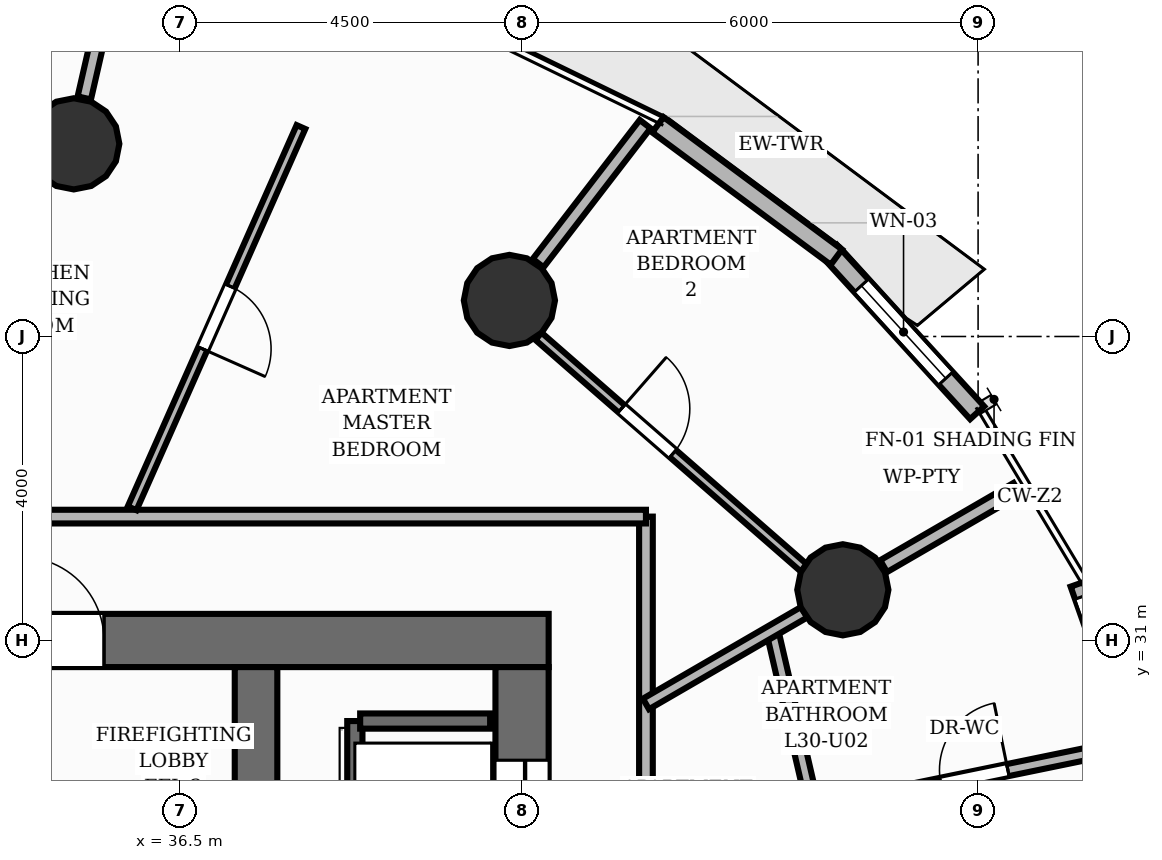
"""IFC4 building model, lengths in metres.
Left out: names, types, materials, properties, quantities, classifications, styles, units other than length and angle.
Written with IfcOpenShell. Run it as: python <this file> out.ifc"""

import sys

from ifc_helpers import new_model, si_unit, direction, frame, frame_2d, origin, origin_2d, place, context, subcontext, project, spatial, rectangle, circle, extrude, element, fill, save


model = new_model("IFC4")
c1 = context("Model", 3, precision=1e-05, world=origin(), true_north=direction((0.0, 1.0)))
c2 = subcontext(c1, "Body", "Model", "MODEL_VIEW")
j1 = project(units=[si_unit("LENGTHUNIT", "METRE"), si_unit("PLANEANGLEUNIT", "RADIAN")], contexts=[c1])
p1 = place(None, origin())
s1 = spatial("IfcSite", under=j1, at=p1, CompositionType="ELEMENT")
p2 = place(p1, origin())
s2 = spatial("IfcBuilding", under=s1, at=p2, CompositionType="ELEMENT")
p3 = place(p2, frame((0.0, 0.0, 102.88)))
s3 = spatial("IfcBuildingStorey", under=s2, at=p3, CompositionType="ELEMENT", Elevation=102.88)
p4 = place(p3, frame((22.65, 31.0, 0.0), z_axis=(0.0, 0.0, 1.0), x_axis=(1.0, 0.0, 0.0)))
e1 = element("IfcWall", 1, at=p4, inside=s3, PredefinedType="SHEAR", context=c2, shape_type="SweptSolid", body=[
    extrude(rectangle(XDim=18.7, YDim=0.7, at=frame_2d((9.35, 0.0))), origin(), (0.0, 0.0, 1.0), 3.2),
])
p5 = place(p4, frame((11.75, 0.0, 0.0)))
e2 = element("IfcOpeningElement", 2, at=p5, cuts=e1, PredefinedType="OPENING", context=c2, shape_type="SweptSolid", body=[
    extrude(rectangle(XDim=1.1, YDim=2.15, at=frame_2d((0.55, 1.075))), frame((0.0, 0.36, 0.0), z_axis=(0.0, -1.0, 0.0), x_axis=(1.0, 0.0, 0.0)), (0.0, 0.0, 1.0), 0.72),
])
p6 = place(p3, frame((41.0, 17.35, 0.0), z_axis=(0.0, 0.0, 1.0), x_axis=(0.0, 1.0, 0.0)))
e3 = element("IfcWall", 3, at=p6, inside=s3, PredefinedType="SHEAR", context=c2, shape_type="SweptSolid", body=[
    extrude(rectangle(XDim=13.3, YDim=0.7, at=frame_2d((6.65, 0.0))), origin(), (0.0, 0.0, 1.0), 3.2),
])
p7 = place(p6, frame((1.225, 0.0, 0.0)))
e4 = element("IfcOpeningElement", 4, at=p7, cuts=e3, PredefinedType="OPENING", context=c2, shape_type="SweptSolid", body=[
    extrude(rectangle(XDim=1.05, YDim=2.15, at=frame_2d((0.525, 1.075))), frame((0.0, 0.36, 0.0), z_axis=(0.0, -1.0, 0.0), x_axis=(1.0, 0.0, 0.0)), (0.0, 0.0, 1.0), 0.72),
])
p8 = place(p6, frame((4.475, 0.0, 0.0)))
e5 = element("IfcOpeningElement", 5, at=p8, cuts=e3, PredefinedType="OPENING", context=c2, shape_type="SweptSolid", body=[
    extrude(rectangle(XDim=1.05, YDim=2.15, at=frame_2d((0.525, 1.075))), frame((0.0, 0.36, 0.0), z_axis=(0.0, -1.0, 0.0), x_axis=(1.0, 0.0, 0.0)), (0.0, 0.0, 1.0), 0.72),
])
p9 = place(p6, frame((7.775, 0.0, 0.0)))
e6 = element("IfcOpeningElement", 6, at=p9, cuts=e3, PredefinedType="OPENING", context=c2, shape_type="SweptSolid", body=[
    extrude(rectangle(XDim=1.05, YDim=2.15, at=frame_2d((0.525, 1.075))), frame((0.0, 0.36, 0.0), z_axis=(0.0, -1.0, 0.0), x_axis=(1.0, 0.0, 0.0)), (0.0, 0.0, 1.0), 0.72),
])
p10 = place(p6, frame((11.025, 0.0, 0.0)))
e7 = element("IfcOpeningElement", 7, at=p10, cuts=e3, PredefinedType="OPENING", context=c2, shape_type="SweptSolid", body=[
    extrude(rectangle(XDim=1.05, YDim=2.15, at=frame_2d((0.525, 1.075))), frame((0.0, 0.36, 0.0), z_axis=(0.0, -1.0, 0.0), x_axis=(1.0, 0.0, 0.0)), (0.0, 0.0, 1.0), 0.72),
])
p11 = place(p3, frame((37.5, 17.35, 0.0), z_axis=(0.0, 0.0, 1.0), x_axis=(0.0, 1.0, 0.0)))
e8 = element("IfcWall", 8, at=p11, inside=s3, PredefinedType="SHEAR", context=c2, shape_type="SweptSolid", body=[
    extrude(rectangle(XDim=13.3, YDim=0.56, at=frame_2d((6.65, 0.0))), origin(), (0.0, 0.0, 1.0), 3.2),
])
for number, where, z_axis, x_axis in (
    (9, (45.22, 31.667, 0.0), (0.0, 0.0, 1.0), (1.0, 0.0, 0.0)),
    (10, (40.833, 35.474, 0.0), (0.0, 0.0, 1.0), (1.0, 0.0, 0.0)),
    (11, (35.102, 37.535, 0.0), (0.0, 0.0, 1.0), (1.0, 0.0, 0.0)),
):
    element("IfcColumn", number, at=place(p3, frame(where, z_axis=z_axis, x_axis=x_axis)), inside=s3, PredefinedType="COLUMN", context=c2, shape_type="SweptSolid", body=[
        extrude(circle(Radius=0.6, at=origin_2d()), origin(), (0.0, 0.0, 1.0), 3.2),
    ])
p12 = place(p3, frame((45.051, 36.121, 0.0), z_axis=(0.0, 0.0, 1.0), x_axis=(0.673691100196, -0.739013059098, 0.0)))
e12 = element("IfcWall", 12, at=p12, inside=s3, PredefinedType="SOLIDWALL", context=c2, shape_type="SweptSolid", body=[
    extrude(rectangle(XDim=2.874, YDim=0.25, at=frame_2d((1.437, 0.0))), origin(), (0.0, 0.0, 1.0), 2.96),
])
p13 = place(p12, frame((0.612, 0.0, 0.85)))
e13 = element("IfcOpeningElement", 13, at=p13, cuts=e12, PredefinedType="OPENING", context=c2, shape_type="SweptSolid", body=[
    extrude(rectangle(XDim=1.65, YDim=1.55, at=frame_2d((0.825, 0.775))), frame((0.0, 0.135, 0.0), z_axis=(0.0, -1.0, 0.0), x_axis=(1.0, 0.0, 0.0)), (0.0, 0.0, 1.0), 0.27),
])
p14 = place(p3, frame((42.787, 37.785, 0.0), z_axis=(0.0, 0.0, 1.0), x_axis=(0.803255279066, -0.595634918933, 0.0)))
e14 = element("IfcWall", 14, at=p14, inside=s3, PredefinedType="SOLIDWALL", context=c2, shape_type="SweptSolid", body=[
    extrude(rectangle(XDim=2.923, YDim=0.25, at=frame_2d((1.462, 0.0))), origin(), (0.0, 0.0, 1.0), 2.96),
])
p15 = place(p3, frame((48.335, 31.75, 0.0), z_axis=(0.0, 0.0, 1.0), x_axis=(0.332923265962, -0.942953921982, 0.0)))
e15 = element("IfcWall", 15, at=p15, inside=s3, PredefinedType="SOLIDWALL", context=c2, shape_type="SweptSolid", body=[
    extrude(rectangle(XDim=2.847, YDim=0.25, at=frame_2d((1.424, 0.0))), origin(), (0.0, 0.0, 1.0), 2.96),
])
p16 = place(p15, frame((0.175, 0.0, 0.85)))
e16 = element("IfcOpeningElement", 16, at=p16, cuts=e15, PredefinedType="OPENING", context=c2, shape_type="SweptSolid", body=[
    extrude(rectangle(XDim=1.65, YDim=1.55, at=frame_2d((0.825, 0.775))), frame((0.0, 0.135, 0.0), z_axis=(0.0, -1.0, 0.0), x_axis=(1.0, 0.0, 0.0)), (0.0, 0.0, 1.0), 0.27),
])
p17 = place(p3, frame((38.8, 18.06, 0.0), z_axis=(0.0, 0.0, 1.0), x_axis=(0.0, 1.0, 0.0)))
e17 = element("IfcWall", 17, at=p17, inside=s3, PredefinedType="SHEAR", context=c2, shape_type="SweptSolid", body=[
    extrude(rectangle(XDim=11.88, YDim=0.2, at=frame_2d((5.94, 0.0))), origin(), (0.0, 0.0, 1.0), 3.2),
])
p18 = place(p3, frame((38.87, 29.94, 0.0), z_axis=(0.0, 0.0, 1.0), x_axis=(1.0, 0.0, 0.0)))
e18 = element("IfcWall", 18, at=p18, inside=s3, PredefinedType="SHEAR", context=c2, shape_type="SweptSolid", body=[
    extrude(rectangle(XDim=1.71, YDim=0.2, at=frame_2d((0.855, 0.0))), origin(), (0.0, 0.0, 1.0), 3.2),
])
p19 = place(p3, frame((45.757, 31.978, 0.0), z_axis=(0.0, 0.0, 1.0), x_axis=(0.865046864493, 0.501691062539, 0.0)))
e19 = element("IfcWall", 19, at=p19, inside=s3, PredefinedType="PARTITIONING", context=c2, shape_type="SweptSolid", body=[
    extrude(rectangle(XDim=2.028, YDim=0.18, at=frame_2d((1.014, 0.0))), origin(), (0.0, 0.0, 1.0), 2.261),
])
p20 = place(p3, frame((41.212, 35.966, 0.0), z_axis=(0.0, 0.0, 1.0), x_axis=(0.610007255548, 0.792395827967, 0.0)))
e20 = element("IfcWall", 20, at=p20, inside=s3, PredefinedType="PARTITIONING", context=c2, shape_type="SweptSolid", body=[
    extrude(rectangle(XDim=2.308, YDim=0.18, at=frame_2d((1.154, 0.0))), origin(), (0.0, 0.0, 1.0), 2.261),
])
p21 = place(p3, frame((35.24, 38.139, 0.0), z_axis=(0.0, 0.0, 1.0), x_axis=(0.2234127464, 0.974723932581, 0.0)))
e21 = element("IfcWall", 21, at=p21, inside=s3, PredefinedType="PARTITIONING", context=c2, shape_type="SweptSolid", body=[
    extrude(rectangle(XDim=1.849, YDim=0.18, at=frame_2d((0.924, 0.0))), origin(), (0.0, 0.0, 1.0), 2.261),
])
p22 = place(p3, frame((42.63, 32.63, 0.0), z_axis=(0.0, 0.0, 1.0), x_axis=(0.0, -1.0, 0.0)))
e22 = element("IfcWall", 22, at=p22, inside=s3, PredefinedType="PARTITIONING", context=c2, shape_type="SweptSolid", body=[
    extrude(rectangle(XDim=6.23, YDim=0.18, at=frame_2d((3.115, 0.0))), origin(), (0.0, 0.0, 1.0), 2.955),
])
p23 = place(p3, frame((22.734, 32.63, 0.0), z_axis=(0.0, 0.0, 1.0), x_axis=(1.0, 0.0, 0.0)))
e23 = element("IfcWall", 23, at=p23, inside=s3, PredefinedType="PARTITIONING", context=c2, shape_type="SweptSolid", body=[
    extrude(rectangle(XDim=19.896, YDim=0.18, at=frame_2d((9.948, 0.0))), origin(), (0.0, 0.0, 1.0), 2.955),
])
p24 = place(p23, frame((11.004, 0.0, 0.0)))
e24 = element("IfcOpeningElement", 24, at=p24, cuts=e23, PredefinedType="OPENING", context=c2, shape_type="SweptSolid", body=[
    extrude(rectangle(XDim=1.05, YDim=2.15, at=frame_2d((0.525, 1.075))), frame((0.0, 0.1, 0.0), z_axis=(0.0, -1.0, 0.0), x_axis=(1.0, 0.0, 0.0)), (0.0, 0.0, 1.0), 0.2),
])
p25 = place(p3, frame((44.838, 28.77, 0.0), z_axis=(0.0, 0.0, 1.0), x_axis=(0.97949547816, 0.201466146695, 0.0)))
e25 = element("IfcWall", 25, at=p25, inside=s3, PredefinedType="PLUMBINGWALL", context=c2, shape_type="SweptSolid", body=[
    extrude(rectangle(XDim=4.315, YDim=0.16, at=frame_2d((2.158, 0.0))), origin(), (0.0, 0.0, 1.0), 2.955),
])
p26 = place(p25, frame((1.708, 0.0, 0.0)))
e26 = element("IfcOpeningElement", 26, at=p26, cuts=e25, PredefinedType="OPENING", context=c2, shape_type="SweptSolid", body=[
    extrude(rectangle(XDim=0.9, YDim=2.1, at=frame_2d((0.45, 1.05))), frame((0.0, 0.09, 0.0), z_axis=(0.0, -1.0, 0.0), x_axis=(1.0, 0.0, 0.0)), (0.0, 0.0, 1.0), 0.18),
])
p27 = place(p3, frame((45.174, 27.315, 0.0), z_axis=(0.0, 0.0, 1.0), x_axis=(-0.225561032487, 0.974229039099, 0.0)))
e27 = element("IfcWall", 27, at=p27, inside=s3, PredefinedType="PLUMBINGWALL", context=c2, shape_type="SweptSolid", body=[
    extrude(rectangle(XDim=3.914, YDim=0.16, at=frame_2d((1.957, 0.0))), origin(), (0.0, 0.0, 1.0), 2.955),
])
p28 = place(p27, frame((0.266, 0.0, 0.0)))
e28 = element("IfcOpeningElement", 28, at=p28, cuts=e27, PredefinedType="OPENING", context=c2, shape_type="SweptSolid", body=[
    extrude(rectangle(XDim=0.9, YDim=2.1, at=frame_2d((0.45, 1.05))), frame((0.0, 0.09, 0.0), z_axis=(0.0, -1.0, 0.0), x_axis=(1.0, 0.0, 0.0)), (0.0, 0.0, 1.0), 0.18),
])
p29 = place(p3, frame((42.63, 30.165, 0.0), z_axis=(0.0, 0.0, 1.0), x_axis=(0.865092804374, 0.501611841786, 0.0)))
e29 = element("IfcWall", 29, at=p29, inside=s3, PredefinedType="PLUMBINGWALL", context=c2, shape_type="SweptSolid", body=[
    extrude(rectangle(XDim=2.407, YDim=0.16, at=frame_2d((1.204, 0.0))), origin(), (0.0, 0.0, 1.0), 2.261),
])
p30 = place(p3, frame((38.091, 37.756, 0.0), z_axis=(0.0, 0.0, 1.0), x_axis=(-0.404874602407, -0.914372219791, 0.0)))
e30 = element("IfcWall", 30, at=p30, inside=s3, PredefinedType="PARTITIONING", context=c2, shape_type="SweptSolid", body=[
    extrude(rectangle(XDim=5.486, YDim=0.125, at=frame_2d((2.743, 0.0))), origin(), (0.0, 0.0, 1.0), 2.955),
])
p31 = place(p30, frame((2.293, 0.0, 0.0)))
e31 = element("IfcOpeningElement", 31, at=p31, cuts=e30, PredefinedType="OPENING", context=c2, shape_type="SweptSolid", body=[
    extrude(rectangle(XDim=0.9, YDim=2.1, at=frame_2d((0.45, 1.05))), frame((0.0, 0.073, 0.0), z_axis=(0.0, -1.0, 0.0), x_axis=(1.0, 0.0, 0.0)), (0.0, 0.0, 1.0), 0.145),
])
p32 = place(p3, frame((41.216, 35.003, 0.0), z_axis=(0.0, 0.0, 1.0), x_axis=(0.753372011099, -0.657594565741, 0.0)))
e32 = element("IfcWall", 32, at=p32, inside=s3, PredefinedType="PARTITIONING", context=c2, shape_type="SweptSolid", body=[
    extrude(rectangle(XDim=4.637, YDim=0.125, at=frame_2d((2.318, 0.0))), origin(), (0.0, 0.0, 1.0), 2.404),
])
p33 = place(p32, frame((1.448, 0.0, 0.0)))
e33 = element("IfcOpeningElement", 33, at=p33, cuts=e32, PredefinedType="OPENING", context=c2, shape_type="SweptSolid", body=[
    extrude(rectangle(XDim=0.9, YDim=2.1, at=frame_2d((0.45, 1.05))), frame((0.0, 0.073, 0.0), z_axis=(0.0, -1.0, 0.0), x_axis=(1.0, 0.0, 0.0)), (0.0, 0.0, 1.0), 0.145),
])
p34 = place(p13, origin())
e34 = element("IfcWindow", 34, at=p34, inside=s3, PartitioningType="SINGLE_PANEL", PredefinedType="WINDOW", context=c2, shape_type="SweptSolid", body=[
    extrude(rectangle(XDim=1.65, YDim=1.55, at=frame_2d((0.825, 0.775))), frame((0.0, 0.03, 0.0), z_axis=(0.0, -1.0, 0.0), x_axis=(1.0, 0.0, 0.0)), (0.0, 0.0, 1.0), 0.06),
])
fill(e13, e34)
p35 = place(p16, origin())
e35 = element("IfcWindow", 35, at=p35, inside=s3, PartitioningType="SINGLE_PANEL", PredefinedType="WINDOW", context=c2, shape_type="SweptSolid", body=[
    extrude(rectangle(XDim=1.65, YDim=1.55, at=frame_2d((0.825, 0.775))), frame((0.0, 0.03, 0.0), z_axis=(0.0, -1.0, 0.0), x_axis=(1.0, 0.0, 0.0)), (0.0, 0.0, 1.0), 0.06),
])
fill(e16, e35)
p36 = place(p5, origin())
e36 = element("IfcDoor", 36, at=p36, inside=s3, OperationType="SINGLE_SWING_LEFT", PredefinedType="DOOR", context=c2, shape_type="SweptSolid", body=[
    extrude(rectangle(XDim=1.1, YDim=2.15, at=frame_2d((0.55, 1.075))), frame((0.0, 0.025, 0.0), z_axis=(0.0, -1.0, 0.0), x_axis=(1.0, 0.0, 0.0)), (0.0, 0.0, 1.0), 0.05),
])
fill(e2, e36)
p37 = place(p10, origin())
e37 = element("IfcDoor", 37, at=p37, inside=s3, OperationType="DOUBLE_DOOR_SLIDING", PredefinedType="DOOR", context=c2, shape_type="SweptSolid", body=[
    extrude(rectangle(XDim=1.05, YDim=2.15, at=frame_2d((0.525, 1.075))), frame((0.0, 0.025, 0.0), z_axis=(0.0, -1.0, 0.0), x_axis=(1.0, 0.0, 0.0)), (0.0, 0.0, 1.0), 0.05),
])
fill(e7, e37)
p38 = place(p26, origin())
e38 = element("IfcDoor", 38, at=p38, inside=s3, OperationType="SINGLE_SWING_RIGHT", PredefinedType="DOOR", context=c2, shape_type="SweptSolid", body=[
    extrude(rectangle(XDim=0.9, YDim=2.1, at=frame_2d((0.45, 1.05))), frame((0.0, 0.025, 0.0), z_axis=(0.0, -1.0, 0.0), x_axis=(1.0, 0.0, 0.0)), (0.0, 0.0, 1.0), 0.05),
])
fill(e26, e38)
p39 = place(p31, origin())
e39 = element("IfcDoor", 39, at=p39, inside=s3, OperationType="SINGLE_SWING_RIGHT", PredefinedType="DOOR", context=c2, shape_type="SweptSolid", body=[
    extrude(rectangle(XDim=0.9, YDim=2.1, at=frame_2d((0.45, 1.05))), frame((0.0, 0.025, 0.0), z_axis=(0.0, -1.0, 0.0), x_axis=(1.0, 0.0, 0.0)), (0.0, 0.0, 1.0), 0.05),
])
fill(e31, e39)
p40 = place(p33, origin())
e40 = element("IfcDoor", 40, at=p40, inside=s3, OperationType="SINGLE_SWING_LEFT", PredefinedType="DOOR", context=c2, shape_type="SweptSolid", body=[
    extrude(rectangle(XDim=0.9, YDim=2.1, at=frame_2d((0.45, 1.05))), frame((0.0, 0.025, 0.0), z_axis=(0.0, -1.0, 0.0), x_axis=(1.0, 0.0, 0.0)), (0.0, 0.0, 1.0), 0.05),
])
fill(e33, e40)
save(model, sys.argv[1])
